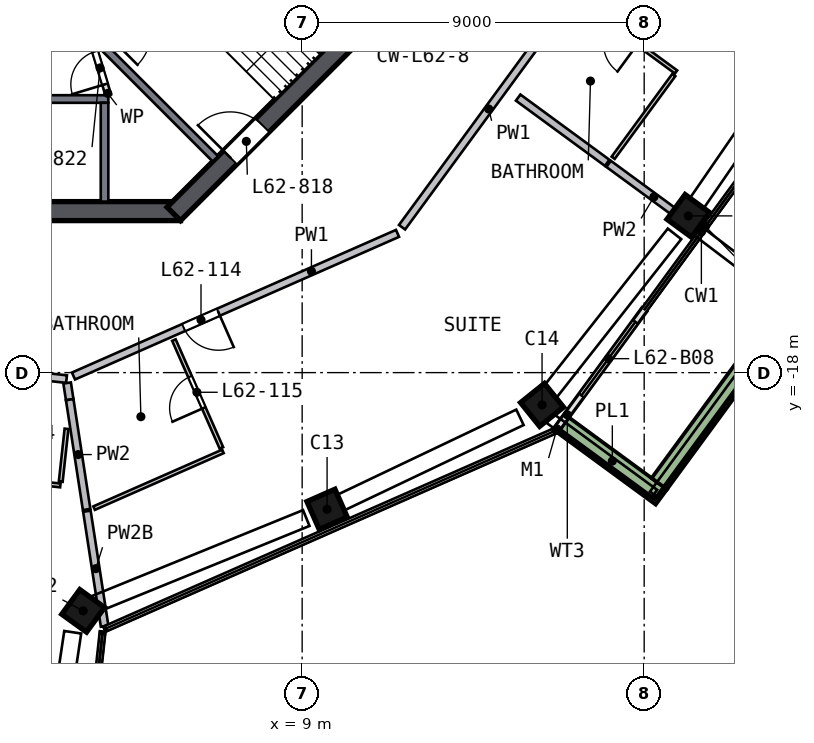
"""IFC4 building model, lengths in metres.
Left out: names, types, materials, properties, quantities, classifications, styles, units other than length and angle.
Written with IfcOpenShell. Run it as: python <this file> out.ifc"""

import sys

from ifc_helpers import new_model, si_unit, direction, frame, frame_2d, origin, origin_2d, place, context, subcontext, project, spatial, rectangle, extrude, element, fill, save


model = new_model("IFC4")
c1 = context("Model", 3, precision=1e-05, world=origin(), true_north=direction((0.0, 1.0)))
c2 = subcontext(c1, "Body", "Model", "MODEL_VIEW")
j1 = project(units=[si_unit("LENGTHUNIT", "METRE"), si_unit("PLANEANGLEUNIT", "RADIAN")], contexts=[c1])
p1 = place(None, origin())
s1 = spatial("IfcSite", under=j1, at=p1, CompositionType="ELEMENT")
p2 = place(p1, origin())
s2 = spatial("IfcBuilding", under=s1, at=p2, CompositionType="ELEMENT")
p3 = place(p2, frame((0.0, 0.0, 252.5)))
s3 = spatial("IfcBuildingStorey", under=s2, at=p3, CompositionType="ELEMENT", Elevation=252.5)
p4 = place(p3, frame((3.098, -24.289, 0.0), z_axis=(0.115313882, 0.015734986, 0.99320447), x_axis=(-0.583465368, -0.808134067, 0.08054498)))
e1 = element("IfcColumn", 1, at=p4, inside=s3, PredefinedType="COLUMN", context=c2, shape_type="SweptSolid", body=[
    extrude(rectangle(XDim=0.8, YDim=0.8, at=origin_2d()), origin(), (0.0, 0.0, 1.0), 3.212),
])
p5 = place(p3, frame((9.532, -21.653, 0.0), z_axis=(0.10266456, 0.046237076, 0.993640841), x_axis=(0.909427025, 0.400331749, -0.112592085)))
e2 = element("IfcColumn", 2, at=p5, inside=s3, PredefinedType="COLUMN", context=c2, shape_type="SweptSolid", body=[
    extrude(rectangle(XDim=0.8, YDim=0.8, at=origin_2d()), origin(), (0.0, 0.0, 1.0), 3.21),
])
p6 = place(p3, frame((15.204, -18.938, 0.0), z_axis=(0.0894781, 0.07305731, 0.993305743), x_axis=(-0.774722887, -0.621660435, 0.115510831)))
e3 = element("IfcColumn", 3, at=p6, inside=s3, PredefinedType="COLUMN", context=c2, shape_type="SweptSolid", body=[
    extrude(rectangle(XDim=0.8, YDim=0.8, at=origin_2d()), origin(), (0.0, 0.0, 1.0), 3.211),
])
p7 = place(p3, frame((19.082, -13.986, 0.0), z_axis=(0.065781659, 0.09133384, 0.99364526), x_axis=(0.587536537, 0.80133178, -0.112553082)))
e4 = element("IfcColumn", 4, at=p7, inside=s3, PredefinedType="COLUMN", context=c2, shape_type="SweptSolid", body=[
    extrude(rectangle(XDim=0.8, YDim=0.8, at=origin_2d()), origin(), (0.0, 0.0, 1.0), 3.21),
])
p8 = place(p3, frame((-5.799, -13.75, 0.0), z_axis=(0.0, 0.0, 1.0), x_axis=(1.0, 0.0, 0.0)))
e5 = element("IfcWall", 5, at=p8, inside=s3, PredefinedType="SHEAR", context=c2, shape_type="SweptSolid", body=[
    extrude(rectangle(XDim=11.598, YDim=0.5, at=frame_2d((5.799, 0.0))), origin(), (0.0, 0.0, 1.0), 3.5),
])
p9 = place(p3, frame((5.622, -13.823, 0.0), z_axis=(0.0, 0.0, 1.0), x_axis=(0.707106781, 0.707106781, 0.0)))
e6 = element("IfcWall", 6, at=p9, inside=s3, PredefinedType="SHEAR", context=c2, shape_type="SweptSolid", body=[
    extrude(rectangle(XDim=11.598, YDim=0.5, at=frame_2d((5.799, 0.0))), origin(), (0.0, 0.0, 1.0), 3.5),
])
p10 = place(p9, frame((2.099, 0.0, 0.0)))
e7 = element("IfcOpeningElement", 7, at=p10, cuts=e6, PredefinedType="OPENING", context=c2, shape_type="SweptSolid", body=[
    extrude(rectangle(XDim=1.2, YDim=2.1, at=frame_2d((0.6, 1.05))), frame((0.0, 0.26, 0.0), z_axis=(0.0, -1.0, 0.0), x_axis=(1.0, 0.0, 0.0)), (0.0, 0.0, 1.0), 0.52),
])
p11 = place(p3, frame((15.722, -19.458, 0.0), z_axis=(0.0, 0.0, 1.0), x_axis=(0.591166376, 0.806549636, 0.0)))
e8 = element("IfcWall", 8, at=p11, inside=s3, PredefinedType="SOLIDWALL", context=c2, shape_type="SweptSolid", body=[
    extrude(rectangle(XDim=3.863, YDim=0.15, at=frame_2d((1.932, 0.0))), origin(), (0.0, 0.0, 1.0), 2.525),
])
p12 = place(p11, frame((1.063, 0.0, 0.0)))
e9 = element("IfcOpeningElement", 9, at=p12, cuts=e8, PredefinedType="OPENING", context=c2, shape_type="SweptSolid", body=[
    extrude(rectangle(XDim=2.4, YDim=2.4, at=frame_2d((1.2, 1.2))), frame((0.0, 0.085, 0.0), z_axis=(0.0, -1.0, 0.0), x_axis=(1.0, 0.0, 0.0)), (0.0, 0.0, 1.0), 0.17),
])
p13 = place(p3, frame((15.872, -19.382, 0.0), z_axis=(0.0, 0.0, 1.0), x_axis=(0.806545701, -0.591171745, 0.0)))
e10 = element("IfcWall", 10, at=p13, inside=s3, PredefinedType="SOLIDWALL", context=c2, shape_type="SweptSolid", body=[
    extrude(rectangle(XDim=3.199, YDim=0.5, at=frame_2d((1.6, 0.0))), origin(), (0.0, 0.0, 1.0), 0.7),
])
p14 = place(p3, frame((18.398, -20.924, 0.0), z_axis=(0.0, 0.0, 1.0), x_axis=(0.591166749, 0.806549363, 0.0)))
e11 = element("IfcWall", 11, at=p14, inside=s3, PredefinedType="SOLIDWALL", context=c2, shape_type="SweptSolid", body=[
    extrude(rectangle(XDim=13.224, YDim=0.5, at=frame_2d((6.612, 0.0))), origin(), (0.0, 0.0, 1.0), 0.7),
])
p15 = place(p3, frame((-3.9, -10.8, 0.0), z_axis=(0.0, 0.0, 1.0), x_axis=(1.0, 0.0, 0.0)))
e12 = element("IfcWall", 12, at=p15, inside=s3, PredefinedType="SOLIDWALL", context=c2, shape_type="SweptSolid", body=[
    extrude(rectangle(XDim=7.8, YDim=0.2, at=frame_2d((3.9, 0.0))), origin(), (0.0, 0.0, 1.0), 3.19),
])
p16 = place(p15, frame((3.45, 0.0, 0.0)))
e13 = element("IfcOpeningElement", 13, at=p16, cuts=e12, PredefinedType="OPENING", context=c2, shape_type="SweptSolid", body=[
    extrude(rectangle(XDim=0.9, YDim=2.1, at=frame_2d((0.45, 1.05))), frame((0.0, 0.11, 0.0), z_axis=(0.0, -1.0, 0.0), x_axis=(1.0, 0.0, 0.0)), (0.0, 0.0, 1.0), 0.22),
])
p17 = place(p3, frame((3.8, -10.9, 0.0), z_axis=(0.0, 0.0, 1.0), x_axis=(0.0, -1.0, 0.0)))
e14 = element("IfcWall", 14, at=p17, inside=s3, PredefinedType="SOLIDWALL", context=c2, shape_type="SweptSolid", body=[
    extrude(rectangle(XDim=2.6, YDim=0.2, at=frame_2d((1.3, 0.0))), origin(), (0.0, 0.0, 1.0), 3.19),
])
p18 = place(p3, frame((3.677, -9.334, 0.0), z_axis=(0.0, 0.0, 1.0), x_axis=(0.707078393, -0.707135168, 0.0)))
e15 = element("IfcWall", 15, at=p18, inside=s3, PredefinedType="SOLIDWALL", context=c2, shape_type="SweptSolid", body=[
    extrude(rectangle(XDim=4.3, YDim=0.2, at=frame_2d((2.15, 0.0))), origin(), (0.0, 0.0, 1.0), 3.19),
])
p19 = place(p3, frame((3.9, -10.7, 0.0), z_axis=(0.0, 0.0, 1.0), x_axis=(-0.289808785, 0.957084567, 0.0)))
e16 = element("IfcWall", 16, at=p19, inside=s3, PredefinedType="PARTITIONING", context=c2, shape_type="SweptSolid", body=[
    extrude(rectangle(XDim=1.501, YDim=0.15, at=frame_2d((0.75, 0.0))), origin(), (0.0, 0.0, 1.0), 3.19),
])
p20 = place(p19, frame((0.301, 0.0, 0.0)))
e17 = element("IfcOpeningElement", 17, at=p20, cuts=e16, PredefinedType="OPENING", context=c2, shape_type="SweptSolid", body=[
    extrude(rectangle(XDim=0.9, YDim=2.1, at=frame_2d((0.45, 1.05))), frame((0.0, 0.085, 0.0), z_axis=(0.0, -1.0, 0.0), x_axis=(1.0, 0.0, 0.0)), (0.0, 0.0, 1.0), 0.17),
])
p21 = place(p3, frame((-0.837, -17.773, 0.0), z_axis=(0.0, 0.0, 1.0), x_axis=(0.994072706, -0.108717317, 0.0)))
e18 = element("IfcWall", 18, at=p21, inside=s3, PredefinedType="SOLIDWALL", context=c2, shape_type="SweptSolid", body=[
    extrude(rectangle(XDim=3.658, YDim=0.2, at=frame_2d((1.829, 0.0))), origin(), (0.0, 0.0, 1.0), 3.19),
])
p22 = place(p3, frame((11.51, -14.336, 0.0), z_axis=(0.0, 0.0, 1.0), x_axis=(-0.915247397, -0.402892297, 0.0)))
e19 = element("IfcWall", 19, at=p22, inside=s3, PredefinedType="SOLIDWALL", context=c2, shape_type="SweptSolid", body=[
    extrude(rectangle(XDim=9.316, YDim=0.2, at=frame_2d((4.658, 0.0))), origin(), (0.0, 0.0, 1.0), 3.19),
])
p23 = place(p22, frame((5.15, 0.0, 0.0)))
e20 = element("IfcOpeningElement", 20, at=p23, cuts=e19, PredefinedType="OPENING", context=c2, shape_type="SweptSolid", body=[
    extrude(rectangle(XDim=1.0, YDim=2.1, at=frame_2d((0.5, 1.05))), frame((0.0, 0.11, 0.0), z_axis=(0.0, -1.0, 0.0), x_axis=(1.0, 0.0, 0.0)), (0.0, 0.0, 1.0), 0.22),
])
p24 = place(p3, frame((17.017, -6.822, 0.0), z_axis=(0.0, 0.0, 1.0), x_axis=(-0.591166262, -0.80654972, 0.0)))
e21 = element("IfcWall", 21, at=p24, inside=s3, PredefinedType="SOLIDWALL", context=c2, shape_type="SweptSolid", body=[
    extrude(rectangle(XDim=9.116, YDim=0.2, at=frame_2d((4.558, 0.0))), origin(), (0.0, 0.0, 1.0), 3.19),
])
p25 = place(p24, frame((0.2, 0.0, 0.0)))
e22 = element("IfcOpeningElement", 22, at=p25, cuts=e21, PredefinedType="OPENING", context=c2, shape_type="SweptSolid", body=[
    extrude(rectangle(XDim=1.0, YDim=2.1, at=frame_2d((0.5, 1.05))), frame((0.0, 0.11, 0.0), z_axis=(0.0, -1.0, 0.0), x_axis=(1.0, 0.0, 0.0)), (0.0, 0.0, 1.0), 0.22),
])
p26 = place(p3, frame((2.816, -18.273, 0.0), z_axis=(0.0, 0.0, 1.0), x_axis=(0.152429332, -0.988314372, 0.0)))
e23 = element("IfcWall", 23, at=p26, inside=s3, PredefinedType="SOLIDWALL", context=c2, shape_type="SweptSolid", body=[
    extrude(rectangle(XDim=0.444, YDim=0.2, at=frame_2d((0.222, 0.0))), origin(), (0.0, 0.0, 1.0), 3.19),
])
p27 = place(p3, frame((2.883, -18.711, 0.0), z_axis=(0.0, 0.0, 1.0), x_axis=(0.152257906, -0.988340796, 0.0)))
e24 = element("IfcWall", 24, at=p27, inside=s3, PredefinedType="SOLIDWALL", context=c2, shape_type="SweptSolid", body=[
    extrude(rectangle(XDim=2.925, YDim=0.2, at=frame_2d((1.462, 0.0))), origin(), (0.0, 0.0, 1.0), 3.19),
])
p28 = place(p3, frame((3.336, -21.647, 0.0), z_axis=(0.0, 0.0, 1.0), x_axis=(0.152320858, -0.988331096, 0.0)))
e25 = element("IfcWall", 25, at=p28, inside=s3, PredefinedType="SOLIDWALL", context=c2, shape_type="SweptSolid", body=[
    extrude(rectangle(XDim=3.061, YDim=0.2, at=frame_2d((1.531, 0.0))), origin(), (0.0, 0.0, 1.0), 2.69),
])
p29 = place(p3, frame((14.684, -10.763, 0.0), z_axis=(0.0, 0.0, 1.0), x_axis=(0.806597338, -0.59110129, 0.0)))
e26 = element("IfcWall", 26, at=p29, inside=s3, PredefinedType="SOLIDWALL", context=c2, shape_type="SweptSolid", body=[
    extrude(rectangle(XDim=2.905, YDim=0.2, at=frame_2d((1.452, 0.0))), origin(), (0.0, 0.0, 1.0), 3.19),
])
p30 = place(p3, frame((17.064, -12.507, 0.0), z_axis=(0.0, 0.0, 1.0), x_axis=(0.806541701, -0.591177202, 0.0)))
e27 = element("IfcWall", 27, at=p30, inside=s3, PredefinedType="SOLIDWALL", context=c2, shape_type="SweptSolid", body=[
    extrude(rectangle(XDim=2.952, YDim=0.2, at=frame_2d((1.476, 0.0))), origin(), (0.0, 0.0, 1.0), 3.19),
])
p31 = place(p3, frame((-0.942, -20.578, 0.0), z_axis=(0.0, 0.0, 1.0), x_axis=(0.994081422, -0.10863759, 0.0)))
e28 = element("IfcWall", 28, at=p31, inside=s3, PredefinedType="PARTITIONING", context=c2, shape_type="SweptSolid", body=[
    extrude(rectangle(XDim=3.6, YDim=0.1, at=frame_2d((1.8, 0.0))), origin(), (0.0, 0.0, 1.0), 3.19),
])
p32 = place(p31, frame((1.2, 0.0, 0.0)))
e29 = element("IfcOpeningElement", 29, at=p32, cuts=e28, PredefinedType="OPENING", context=c2, shape_type="SweptSolid", body=[
    extrude(rectangle(XDim=1.0, YDim=2.1, at=frame_2d((0.5, 1.05))), frame((0.0, 0.06, 0.0), z_axis=(0.0, -1.0, 0.0), x_axis=(1.0, 0.0, 0.0)), (0.0, 0.0, 1.0), 0.12),
])
p33 = place(p3, frame((2.799, -19.479, 0.0), z_axis=(0.0, 0.0, 1.0), x_axis=(-0.108764329, -0.994067563, 0.0)))
e30 = element("IfcWall", 30, at=p33, inside=s3, PredefinedType="PARTITIONING", context=c2, shape_type="SweptSolid", body=[
    extrude(rectangle(XDim=1.398, YDim=0.1, at=frame_2d((0.699, 0.0))), origin(), (0.0, 0.0, 1.0), 3.19),
])
p34 = place(p3, frame((6.916, -20.073, 0.0), z_axis=(0.0, 0.0, 1.0), x_axis=(-0.915238238, -0.402913103, 0.0)))
e31 = element("IfcWall", 31, at=p34, inside=s3, PredefinedType="PARTITIONING", context=c2, shape_type="SweptSolid", body=[
    extrude(rectangle(XDim=3.704, YDim=0.1, at=frame_2d((1.852, 0.0))), origin(), (0.0, 0.0, 1.0), 3.19),
])
p35 = place(p3, frame((6.875, -19.982, 0.0), z_axis=(0.0, 0.0, 1.0), x_axis=(-0.402891678, 0.915247669, 0.0)))
e32 = element("IfcWall", 32, at=p35, inside=s3, PredefinedType="PARTITIONING", context=c2, shape_type="SweptSolid", body=[
    extrude(rectangle(XDim=3.1, YDim=0.1, at=frame_2d((1.55, 0.0))), origin(), (0.0, 0.0, 1.0), 3.19),
])
p36 = place(p35, frame((1.15, 0.0, 0.0)))
e33 = element("IfcOpeningElement", 33, at=p36, cuts=e32, PredefinedType="OPENING", context=c2, shape_type="SweptSolid", body=[
    extrude(rectangle(XDim=0.9, YDim=2.1, at=frame_2d((0.45, 1.05))), frame((0.0, 0.06, 0.0), z_axis=(0.0, -1.0, 0.0), x_axis=(1.0, 0.0, 0.0)), (0.0, 0.0, 1.0), 0.12),
])
p37 = place(p3, frame((18.839, -10.088, 0.0), z_axis=(0.0, 0.0, 1.0), x_axis=(-0.806552937, 0.591161873, 0.0)))
e34 = element("IfcWall", 34, at=p37, inside=s3, PredefinedType="PARTITIONING", context=c2, shape_type="SweptSolid", body=[
    extrude(rectangle(XDim=3.2, YDim=0.1, at=frame_2d((1.6, 0.0))), origin(), (0.0, 0.0, 1.0), 3.19),
])
p38 = place(p37, frame((1.25, 0.0, 0.0)))
e35 = element("IfcOpeningElement", 35, at=p38, cuts=e34, PredefinedType="OPENING", context=c2, shape_type="SweptSolid", body=[
    extrude(rectangle(XDim=0.9, YDim=2.1, at=frame_2d((0.45, 1.05))), frame((0.0, 0.06, 0.0), z_axis=(0.0, -1.0, 0.0), x_axis=(1.0, 0.0, 0.0)), (0.0, 0.0, 1.0), 0.12),
])
p39 = place(p3, frame((18.78, -10.169, 0.0), z_axis=(0.0, 0.0, 1.0), x_axis=(-0.591210764, -0.8065171, 0.0)))
e36 = element("IfcWall", 36, at=p39, inside=s3, PredefinedType="PARTITIONING", context=c2, shape_type="SweptSolid", body=[
    extrude(rectangle(XDim=2.7, YDim=0.1, at=frame_2d((1.35, 0.0))), origin(), (0.0, 0.0, 1.0), 3.19),
])
p40 = place(p12, origin())
e37 = element("IfcDoor", 37, at=p40, inside=s3, OperationType="SLIDING_TO_LEFT", PredefinedType="DOOR", context=c2, shape_type="SweptSolid", body=[
    extrude(rectangle(XDim=2.4, YDim=2.4, at=frame_2d((1.2, 1.2))), frame((0.0, 0.025, 0.0), z_axis=(0.0, -1.0, 0.0), x_axis=(1.0, 0.0, 0.0)), (0.0, 0.0, 1.0), 0.05),
])
fill(e9, e37)
p41 = place(p10, origin())
e38 = element("IfcDoor", 38, at=p41, inside=s3, OperationType="SINGLE_SWING_LEFT", PredefinedType="DOOR", context=c2, shape_type="SweptSolid", body=[
    extrude(rectangle(XDim=1.2, YDim=2.1, at=frame_2d((0.6, 1.05))), frame((0.0, 0.025, 0.0), z_axis=(0.0, -1.0, 0.0), x_axis=(1.0, 0.0, 0.0)), (0.0, 0.0, 1.0), 0.05),
])
fill(e7, e38)
p42 = place(p20, origin())
e39 = element("IfcDoor", 39, at=p42, inside=s3, OperationType="SINGLE_SWING_LEFT", PredefinedType="DOOR", context=c2, shape_type="SweptSolid", body=[
    extrude(rectangle(XDim=0.9, YDim=2.1, at=frame_2d((0.45, 1.05))), frame((0.0, 0.025, 0.0), z_axis=(0.0, -1.0, 0.0), x_axis=(1.0, 0.0, 0.0)), (0.0, 0.0, 1.0), 0.05),
])
fill(e17, e39)
p43 = place(p23, origin())
e40 = element("IfcDoor", 40, at=p43, inside=s3, OperationType="SINGLE_SWING_LEFT", PredefinedType="DOOR", context=c2, shape_type="SweptSolid", body=[
    extrude(rectangle(XDim=1.0, YDim=2.1, at=frame_2d((0.5, 1.05))), frame((0.0, 0.025, 0.0), z_axis=(0.0, -1.0, 0.0), x_axis=(1.0, 0.0, 0.0)), (0.0, 0.0, 1.0), 0.05),
])
fill(e20, e40)
p44 = place(p36, origin())
e41 = element("IfcDoor", 41, at=p44, inside=s3, OperationType="SINGLE_SWING_LEFT", PredefinedType="DOOR", context=c2, shape_type="SweptSolid", body=[
    extrude(rectangle(XDim=0.9, YDim=2.1, at=frame_2d((0.45, 1.05))), frame((0.0, 0.025, 0.0), z_axis=(0.0, -1.0, 0.0), x_axis=(1.0, 0.0, 0.0)), (0.0, 0.0, 1.0), 0.05),
])
fill(e33, e41)
save(model, sys.argv[1])
